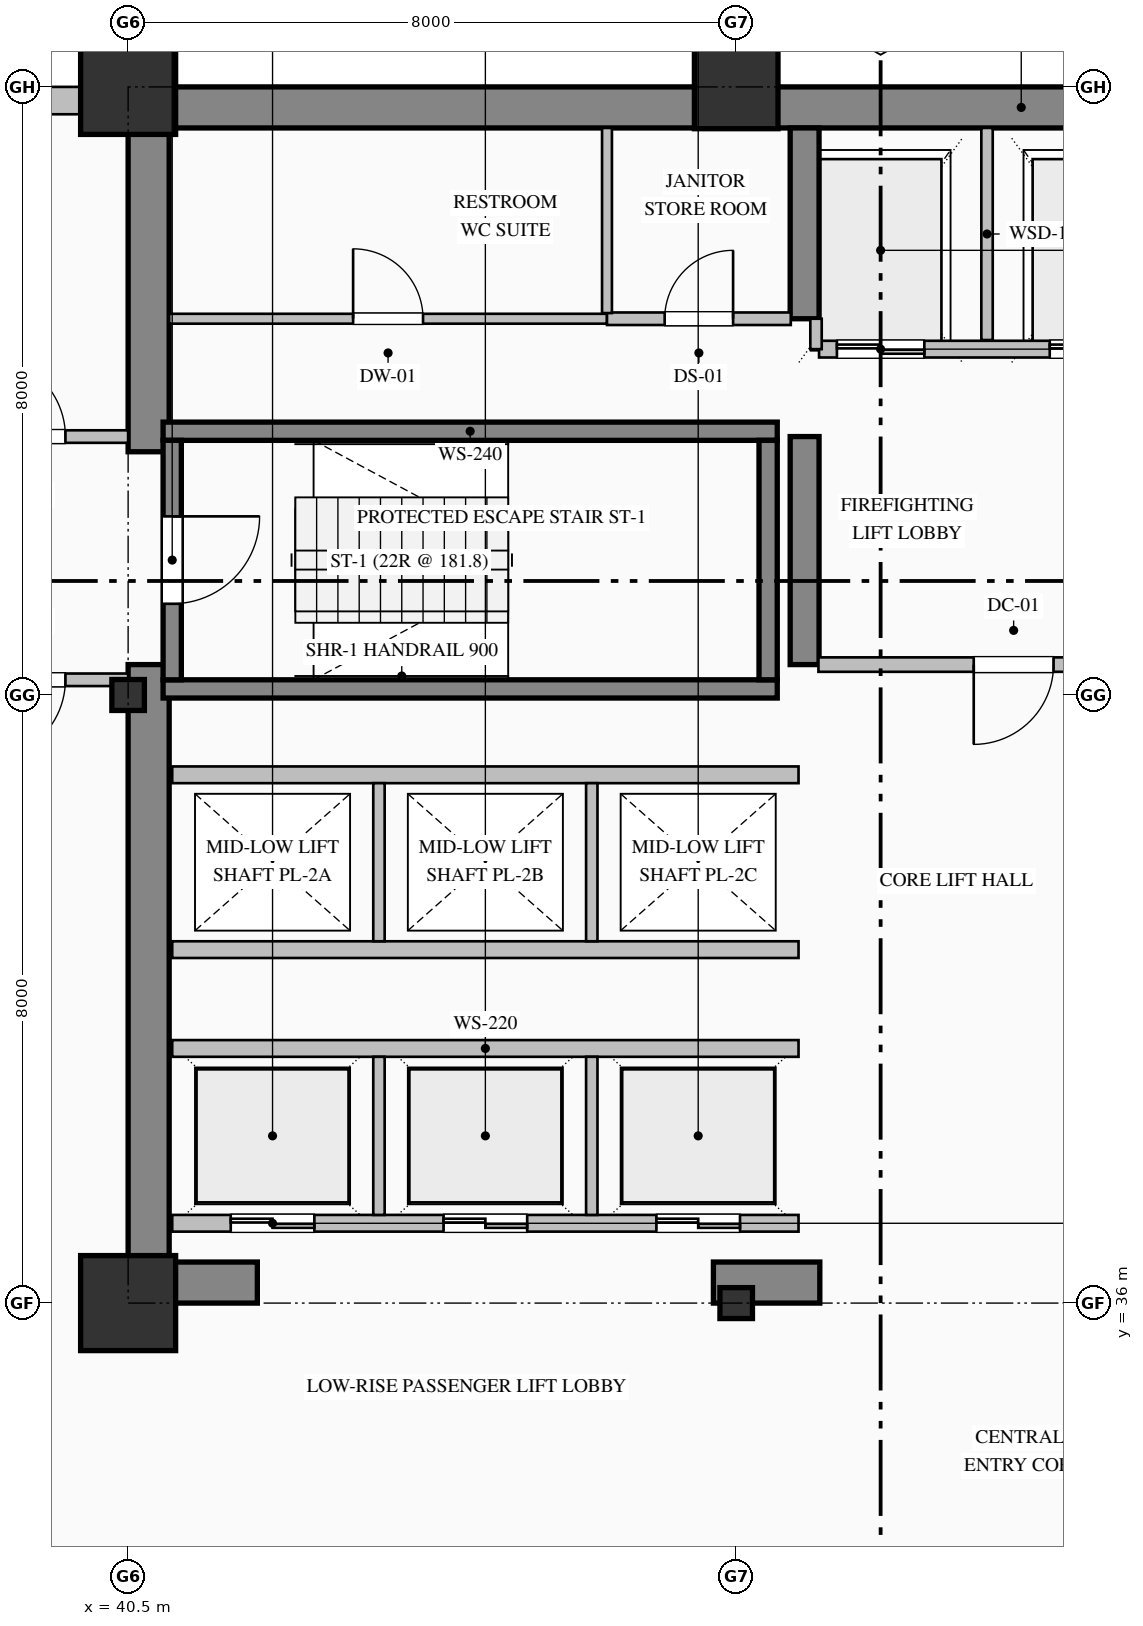
"""IFC4 building model, lengths in metres.
Left out: names, types, materials, properties, quantities, classifications, styles, units other than length and angle.
Written with IfcOpenShell. Run it as: python <this file> out.ifc"""

import sys

from ifc_helpers import new_model, si_unit, direction, frame, frame_2d, origin, origin_2d, place, context, subcontext, project, spatial, rectangle, hollow_rectangle, i_section, extrude, element, fill, save


model = new_model("IFC4")
c1 = context("Model", 3, precision=1e-05, world=origin(), true_north=direction((0.0, 1.0)))
c2 = subcontext(c1, "Body", "Model", "MODEL_VIEW")
j1 = project(units=[si_unit("LENGTHUNIT", "METRE"), si_unit("PLANEANGLEUNIT", "RADIAN")], contexts=[c1])
p1 = place(None, origin())
s1 = spatial("IfcSite", under=j1, at=p1, CompositionType="ELEMENT")
p2 = place(p1, origin())
s2 = spatial("IfcBuilding", under=s1, at=p2, CompositionType="ELEMENT")
p3 = place(p2, frame((0.0, 0.0, 92.2)))
s3 = spatial("IfcBuildingStorey", under=s2, at=p3, CompositionType="ELEMENT", Elevation=92.2)
p4 = place(p3, frame((40.5, 51.73, 0.0), z_axis=(0.0, 0.0, 1.0), x_axis=(1.0, 0.0, 0.0)))
e1 = element("IfcWall", 1, at=p4, inside=s3, PredefinedType="SHEAR", context=c2, shape_type="SweptSolid", body=[
    extrude(rectangle(XDim=23.5, YDim=0.54, at=frame_2d((11.75, 0.0))), origin(), (0.0, 0.0, 1.0), 3.75),
])
p5 = place(p3, frame((40.77, 36.54, 0.0), z_axis=(0.0, 0.0, 1.0), x_axis=(0.0, 1.0, 0.0)))
e2 = element("IfcWall", 2, at=p5, inside=s3, PredefinedType="SHEAR", context=c2, shape_type="SweptSolid", body=[
    extrude(rectangle(XDim=7.86, YDim=0.54, at=frame_2d((3.93, 0.0))), origin(), (0.0, 0.0, 1.0), 3.75),
])
p6 = place(p3, frame((40.77, 47.2, 0.0), z_axis=(0.0, 0.0, 1.0), x_axis=(0.0, 1.0, 0.0)))
e3 = element("IfcWall", 3, at=p6, inside=s3, PredefinedType="SHEAR", context=c2, shape_type="SweptSolid", body=[
    extrude(rectangle(XDim=4.26, YDim=0.54, at=frame_2d((2.13, 0.0))), origin(), (0.0, 0.0, 1.0), 3.75),
])
p7 = place(p3, frame((40.5, 36.27, 0.0), z_axis=(0.0, 0.0, 1.0), x_axis=(1.0, 0.0, 0.0)))
e4 = element("IfcWall", 4, at=p7, inside=s3, PredefinedType="SHEAR", context=c2, shape_type="SweptSolid", body=[
    extrude(rectangle(XDim=1.7, YDim=0.54, at=frame_2d((0.85, 0.0))), origin(), (0.0, 0.0, 1.0), 3.75),
])
p8 = place(p3, frame((48.2, 36.27, 0.0), z_axis=(0.0, 0.0, 1.0), x_axis=(1.0, 0.0, 0.0)))
e5 = element("IfcWall", 5, at=p8, inside=s3, PredefinedType="SHEAR", context=c2, shape_type="SweptSolid", body=[
    extrude(rectangle(XDim=1.4, YDim=0.54, at=frame_2d((0.7, 0.0))), origin(), (0.0, 0.0, 1.0), 3.75),
])
p9 = place(p3, frame((49.4, 44.4, 0.0), z_axis=(0.0, 0.0, 1.0), x_axis=(0.0, 1.0, 0.0)))
e6 = element("IfcWall", 6, at=p9, inside=s3, PredefinedType="SHEAR", context=c2, shape_type="SweptSolid", body=[
    extrude(rectangle(XDim=3.0, YDim=0.38, at=frame_2d((1.5, 0.0))), origin(), (0.0, 0.0, 1.0), 3.75),
])
p10 = place(p3, frame((49.4, 48.95, 0.0), z_axis=(0.0, 0.0, 1.0), x_axis=(0.0, 1.0, 0.0)))
e7 = element("IfcWall", 7, at=p10, inside=s3, PredefinedType="SHEAR", context=c2, shape_type="SweptSolid", body=[
    extrude(rectangle(XDim=2.51, YDim=0.38, at=frame_2d((1.255, 0.0))), origin(), (0.0, 0.0, 1.0), 3.75),
])
p11 = place(p3, frame((40.5, 36.0, 0.0), z_axis=(0.0, 0.0, 1.0), x_axis=(1.0, 0.0, 0.0)))
e8 = element("IfcColumn", 8, at=p11, inside=s3, PredefinedType="COLUMN", context=c2, shape_type="SweptSolid", body=[
    extrude(hollow_rectangle(XDim=1.25, YDim=1.25, WallThickness=0.045, at=origin_2d()), origin(), (0.0, 0.0, 1.0), 4.0),
])
p12 = place(p3, frame((40.5, 44.0, 0.0), z_axis=(0.0, 0.0, 1.0), x_axis=(1.0, 0.0, 0.0)))
e9 = element("IfcColumn", 9, at=p12, inside=s3, PredefinedType="COLUMN", context=c2, shape_type="SweptSolid", body=[
    extrude(i_section(OverallWidth=0.407, OverallDepth=0.428, WebThickness=0.02, FlangeThickness=0.035, FilletRadius=0.022, at=origin_2d()), origin(), (0.0, 0.0, 1.0), 4.0),
])
p13 = place(p3, frame((40.5, 52.0, 0.0), z_axis=(0.0, 0.0, 1.0), x_axis=(1.0, 0.0, 0.0)))
e10 = element("IfcColumn", 10, at=p13, inside=s3, PredefinedType="COLUMN", context=c2, shape_type="SweptSolid", body=[
    extrude(hollow_rectangle(XDim=1.25, YDim=1.25, WallThickness=0.045, at=origin_2d()), origin(), (0.0, 0.0, 1.0), 4.0),
])
p14 = place(p3, frame((48.5, 36.0, 0.0), z_axis=(0.0, 0.0, 1.0), x_axis=(1.0, 0.0, 0.0)))
e11 = element("IfcColumn", 11, at=p14, inside=s3, PredefinedType="COLUMN", context=c2, shape_type="SweptSolid", body=[
    extrude(i_section(OverallWidth=0.407, OverallDepth=0.428, WebThickness=0.02, FlangeThickness=0.035, FilletRadius=0.022, at=origin_2d()), origin(), (0.0, 0.0, 1.0), 4.0),
])
p15 = place(p3, frame((48.5, 52.0, 0.0), z_axis=(0.0, 0.0, 1.0), x_axis=(1.0, 0.0, 0.0)))
e12 = element("IfcColumn", 12, at=p15, inside=s3, PredefinedType="COLUMN", context=c2, shape_type="SweptSolid", body=[
    extrude(hollow_rectangle(XDim=1.1, YDim=1.1, WallThickness=0.04, at=origin_2d()), origin(), (0.0, 0.0, 1.0), 4.0),
])
p16 = place(p3, frame((4.0, 51.82, 0.0), z_axis=(0.0, 0.0, 1.0), x_axis=(1.0, 0.0, 0.0)))
e13 = element("IfcWall", 13, at=p16, inside=s3, PredefinedType="SOLIDWALL", context=c2, shape_type="SweptSolid", body=[
    extrude(rectangle(XDim=36.52, YDim=0.36, at=frame_2d((18.26, 0.0))), origin(), (0.0, 0.0, 1.0), 3.25),
])
p17 = place(p16, frame((16.95, 0.0, 0.85)))
e14 = element("IfcOpeningElement", 14, at=p17, cuts=e13, PredefinedType="OPENING", context=c2, shape_type="SweptSolid", body=[
    extrude(rectangle(XDim=2.1, YDim=2.05, at=frame_2d((1.05, 1.025))), frame((0.0, 0.19, 0.0), z_axis=(0.0, -1.0, 0.0), x_axis=(1.0, 0.0, 0.0)), (0.0, 0.0, 1.0), 0.38),
])
p18 = place(p16, frame((24.3, 0.0, 0.85)))
e15 = element("IfcOpeningElement", 15, at=p18, cuts=e13, PredefinedType="OPENING", context=c2, shape_type="SweptSolid", body=[
    extrude(rectangle(XDim=1.8, YDim=2.05, at=frame_2d((0.9, 1.025))), frame((0.0, 0.19, 0.0), z_axis=(0.0, -1.0, 0.0), x_axis=(1.0, 0.0, 0.0)), (0.0, 0.0, 1.0), 0.38),
])
for number, where, z_axis, x_axis in (
    (16, (40.96, 47.47, 0.0), (0.0, 0.0, 1.0), (1.0, 0.0, 0.0)),
    (17, (49.04, 44.08, 0.0), (0.0, 0.0, 1.0), (-1.0, 0.0, 0.0)),
):
    element("IfcWall", number, at=place(p3, frame(where, z_axis=z_axis, x_axis=x_axis)), inside=s3, PredefinedType="SOLIDWALL", context=c2, shape_type="SweptSolid", body=[
        extrude(rectangle(XDim=8.08, YDim=0.24, at=frame_2d((4.04, 0.0))), origin(), (0.0, 0.0, 1.0), 4.0),
    ])
p19 = place(p3, frame((41.08, 47.35, 0.0), z_axis=(0.0, 0.0, 1.0), x_axis=(0.0, -1.0, 0.0)))
e18 = element("IfcWall", 18, at=p19, inside=s3, PredefinedType="SOLIDWALL", context=c2, shape_type="SweptSolid", body=[
    extrude(rectangle(XDim=3.15, YDim=0.24, at=frame_2d((1.575, 0.0))), origin(), (0.0, 0.0, 1.0), 4.0),
])
p20 = place(p19, frame((1.0, 0.0, 0.0)))
e19 = element("IfcOpeningElement", 19, at=p20, cuts=e18, PredefinedType="OPENING", context=c2, shape_type="SweptSolid", body=[
    extrude(rectangle(XDim=1.15, YDim=2.2, at=frame_2d((0.575, 1.1))), frame((0.0, 0.13, 0.0), z_axis=(0.0, -1.0, 0.0), x_axis=(1.0, 0.0, 0.0)), (0.0, 0.0, 1.0), 0.26),
])
p21 = place(p3, frame((48.92, 44.2, 0.0), z_axis=(0.0, 0.0, 1.0), x_axis=(0.0, 1.0, 0.0)))
e20 = element("IfcWall", 20, at=p21, inside=s3, PredefinedType="SOLIDWALL", context=c2, shape_type="SweptSolid", body=[
    extrude(rectangle(XDim=3.15, YDim=0.24, at=frame_2d((1.575, 0.0))), origin(), (0.0, 0.0, 1.0), 4.0),
])
p22 = place(p3, frame((54.71, 48.55, 0.0), z_axis=(0.0, 0.0, 1.0), x_axis=(-1.0, 0.0, 0.0)))
e21 = element("IfcWall", 21, at=p22, inside=s3, PredefinedType="PARTITIONING", context=c2, shape_type="SweptSolid", body=[
    extrude(rectangle(XDim=5.12, YDim=0.22, at=frame_2d((2.56, 0.0))), origin(), (0.0, 0.0, 1.0), 3.75),
])
p23 = place(p22, frame((3.735, 0.0, 0.0)))
e22 = element("IfcOpeningElement", 22, at=p23, cuts=e21, PredefinedType="OPENING", context=c2, shape_type="SweptSolid", body=[
    extrude(rectangle(XDim=1.15, YDim=2.2, at=frame_2d((0.575, 1.1))), frame((0.0, 0.12, 0.0), z_axis=(0.0, -1.0, 0.0), x_axis=(1.0, 0.0, 0.0)), (0.0, 0.0, 1.0), 0.24),
])
p24 = place(p22, frame((0.935, 0.0, 0.0)))
e23 = element("IfcOpeningElement", 23, at=p24, cuts=e21, PredefinedType="OPENING", context=c2, shape_type="SweptSolid", body=[
    extrude(rectangle(XDim=1.15, YDim=2.2, at=frame_2d((0.575, 1.1))), frame((0.0, 0.12, 0.0), z_axis=(0.0, -1.0, 0.0), x_axis=(1.0, 0.0, 0.0)), (0.0, 0.0, 1.0), 0.24),
])
p25 = place(p3, frame((51.8, 48.67, 0.0), z_axis=(0.0, 0.0, 1.0), x_axis=(0.0, 1.0, 0.0)))
e24 = element("IfcWall", 24, at=p25, inside=s3, PredefinedType="PARTITIONING", context=c2, shape_type="SweptSolid", body=[
    extrude(rectangle(XDim=2.79, YDim=0.15, at=frame_2d((1.395, 0.0))), origin(), (0.0, 0.0, 1.0), 3.75),
])
p26 = place(p3, frame((49.55, 48.55, 0.0), z_axis=(0.0, 0.0, 1.0), x_axis=(0.0, 1.0, 0.0)))
e25 = element("IfcWall", 25, at=p26, inside=s3, PredefinedType="PARTITIONING", context=c2, shape_type="SweptSolid", body=[
    extrude(rectangle(XDim=0.4, YDim=0.15, at=frame_2d((0.2, 0.0))), origin(), (0.0, 0.0, 1.0), 3.75),
])
p27 = place(p3, frame((49.32, 37.05, 0.0), z_axis=(0.0, 0.0, 1.0), x_axis=(-1.0, 0.0, 0.0)))
e26 = element("IfcWall", 26, at=p27, inside=s3, PredefinedType="PARTITIONING", context=c2, shape_type="SweptSolid", body=[
    extrude(rectangle(XDim=8.24, YDim=0.22, at=frame_2d((4.12, 0.0))), origin(), (0.0, 0.0, 1.0), 3.75),
])
p28 = place(p27, frame((6.37, 0.0, 0.0)))
e27 = element("IfcOpeningElement", 27, at=p28, cuts=e26, PredefinedType="OPENING", context=c2, shape_type="SweptSolid", body=[
    extrude(rectangle(XDim=1.1, YDim=2.2, at=frame_2d((0.55, 1.1))), frame((0.0, 0.12, 0.0), z_axis=(0.0, -1.0, 0.0), x_axis=(1.0, 0.0, 0.0)), (0.0, 0.0, 1.0), 0.24),
])
p29 = place(p27, frame((3.57, 0.0, 0.0)))
e28 = element("IfcOpeningElement", 28, at=p29, cuts=e26, PredefinedType="OPENING", context=c2, shape_type="SweptSolid", body=[
    extrude(rectangle(XDim=1.1, YDim=2.2, at=frame_2d((0.55, 1.1))), frame((0.0, 0.12, 0.0), z_axis=(0.0, -1.0, 0.0), x_axis=(1.0, 0.0, 0.0)), (0.0, 0.0, 1.0), 0.24),
])
p30 = place(p27, frame((0.77, 0.0, 0.0)))
e29 = element("IfcOpeningElement", 29, at=p30, cuts=e26, PredefinedType="OPENING", context=c2, shape_type="SweptSolid", body=[
    extrude(rectangle(XDim=1.1, YDim=2.2, at=frame_2d((0.55, 1.1))), frame((0.0, 0.12, 0.0), z_axis=(0.0, -1.0, 0.0), x_axis=(1.0, 0.0, 0.0)), (0.0, 0.0, 1.0), 0.24),
])
p31 = place(p3, frame((41.08, 39.35, 0.0), z_axis=(0.0, 0.0, 1.0), x_axis=(1.0, 0.0, 0.0)))
e30 = element("IfcWall", 30, at=p31, inside=s3, PredefinedType="PARTITIONING", context=c2, shape_type="SweptSolid", body=[
    extrude(rectangle(XDim=8.24, YDim=0.22, at=frame_2d((4.12, 0.0))), origin(), (0.0, 0.0, 1.0), 3.75),
])
for number, where, z_axis, x_axis in (
    (31, (43.8, 37.16, 0.0), (0.0, 0.0, 1.0), (0.0, 1.0, 0.0)),
    (32, (46.6, 37.16, 0.0), (0.0, 0.0, 1.0), (0.0, 1.0, 0.0)),
):
    element("IfcWall", number, at=place(p3, frame(where, z_axis=z_axis, x_axis=x_axis)), inside=s3, PredefinedType="PARTITIONING", context=c2, shape_type="SweptSolid", body=[
        extrude(rectangle(XDim=2.08, YDim=0.15, at=frame_2d((1.04, 0.0))), origin(), (0.0, 0.0, 1.0), 3.75),
    ])
for number, where, z_axis, x_axis in (
    (33, (49.32, 40.65, 0.0), (0.0, 0.0, 1.0), (-1.0, 0.0, 0.0)),
    (34, (41.08, 42.95, 0.0), (0.0, 0.0, 1.0), (1.0, 0.0, 0.0)),
):
    element("IfcWall", number, at=place(p3, frame(where, z_axis=z_axis, x_axis=x_axis)), inside=s3, PredefinedType="PARTITIONING", context=c2, shape_type="SweptSolid", body=[
        extrude(rectangle(XDim=8.24, YDim=0.22, at=frame_2d((4.12, 0.0))), origin(), (0.0, 0.0, 1.0), 3.75),
    ])
for number, where, z_axis, x_axis in (
    (35, (43.8, 40.76, 0.0), (0.0, 0.0, 1.0), (0.0, 1.0, 0.0)),
    (36, (46.6, 40.76, 0.0), (0.0, 0.0, 1.0), (0.0, 1.0, 0.0)),
):
    element("IfcWall", number, at=place(p3, frame(where, z_axis=z_axis, x_axis=x_axis)), inside=s3, PredefinedType="PARTITIONING", context=c2, shape_type="SweptSolid", body=[
        extrude(rectangle(XDim=2.08, YDim=0.15, at=frame_2d((1.04, 0.0))), origin(), (0.0, 0.0, 1.0), 3.75),
    ])
p32 = place(p3, frame((37.8, 47.4, 0.0), z_axis=(0.0, 0.0, 1.0), x_axis=(1.0, 0.0, 0.0)))
e37 = element("IfcWall", 37, at=p32, inside=s3, PredefinedType="PARTITIONING", context=c2, shape_type="SweptSolid", body=[
    extrude(rectangle(XDim=2.7, YDim=0.165, at=frame_2d((1.35, 0.0))), origin(), (0.0, 0.0, 1.0), 3.75),
])
p33 = place(p32, frame((0.825, 0.0, 0.0)))
e38 = element("IfcOpeningElement", 38, at=p33, cuts=e37, PredefinedType="OPENING", context=c2, shape_type="SweptSolid", body=[
    extrude(rectangle(XDim=1.05, YDim=2.15, at=frame_2d((0.525, 1.075))), frame((0.0, 0.093, 0.0), z_axis=(0.0, -1.0, 0.0), x_axis=(1.0, 0.0, 0.0)), (0.0, 0.0, 1.0), 0.185),
])
p34 = place(p3, frame((40.5, 44.2, 0.0), z_axis=(0.0, 0.0, 1.0), x_axis=(-1.0, 0.0, 0.0)))
e39 = element("IfcWall", 39, at=p34, inside=s3, PredefinedType="PARTITIONING", context=c2, shape_type="SweptSolid", body=[
    extrude(rectangle(XDim=2.7, YDim=0.165, at=frame_2d((1.35, 0.0))), origin(), (0.0, 0.0, 1.0), 3.75),
])
p35 = place(p34, frame((0.825, 0.0, 0.0)))
e40 = element("IfcOpeningElement", 40, at=p35, cuts=e39, PredefinedType="OPENING", context=c2, shape_type="SweptSolid", body=[
    extrude(rectangle(XDim=1.05, YDim=2.15, at=frame_2d((0.525, 1.075))), frame((0.0, 0.093, 0.0), z_axis=(0.0, -1.0, 0.0), x_axis=(1.0, 0.0, 0.0)), (0.0, 0.0, 1.0), 0.185),
])
p36 = place(p3, frame((41.04, 48.95, 0.0), z_axis=(0.0, 0.0, 1.0), x_axis=(1.0, 0.0, 0.0)))
e41 = element("IfcWall", 41, at=p36, inside=s3, PredefinedType="PARTITIONING", context=c2, shape_type="SweptSolid", body=[
    extrude(rectangle(XDim=5.76, YDim=0.13, at=frame_2d((2.88, 0.0))), origin(), (0.0, 0.0, 1.0), 3.75),
])
p37 = place(p36, frame((2.42, 0.0, 0.0)))
e42 = element("IfcOpeningElement", 42, at=p37, cuts=e41, PredefinedType="OPENING", context=c2, shape_type="SweptSolid", body=[
    extrude(rectangle(XDim=0.92, YDim=2.15, at=frame_2d((0.46, 1.075))), frame((0.0, 0.075, 0.0), z_axis=(0.0, -1.0, 0.0), x_axis=(1.0, 0.0, 0.0)), (0.0, 0.0, 1.0), 0.15),
])
p38 = place(p3, frame((46.8, 48.95, 0.0), z_axis=(0.0, 0.0, 1.0), x_axis=(1.0, 0.0, 0.0)))
e43 = element("IfcWall", 43, at=p38, inside=s3, PredefinedType="PARTITIONING", context=c2, shape_type="SweptSolid", body=[
    extrude(rectangle(XDim=2.418, YDim=0.165, at=frame_2d((1.209, 0.0))), origin(), (0.0, 0.0, 1.0), 3.75),
])
p39 = place(p38, frame((0.759, 0.0, 0.0)))
e44 = element("IfcOpeningElement", 44, at=p39, cuts=e43, PredefinedType="OPENING", context=c2, shape_type="SweptSolid", body=[
    extrude(rectangle(XDim=0.9, YDim=2.15, at=frame_2d((0.45, 1.075))), frame((0.0, 0.093, 0.0), z_axis=(0.0, -1.0, 0.0), x_axis=(1.0, 0.0, 0.0)), (0.0, 0.0, 1.0), 0.185),
])
p40 = place(p3, frame((54.718, 44.4, 0.0), z_axis=(0.0, 0.0, 1.0), x_axis=(-1.0, 0.0, 0.0)))
e45 = element("IfcWall", 45, at=p40, inside=s3, PredefinedType="PARTITIONING", context=c2, shape_type="SweptSolid", body=[
    extrude(rectangle(XDim=5.136, YDim=0.19, at=frame_2d((2.568, 0.0))), origin(), (0.0, 0.0, 1.0), 3.75),
])
p41 = place(p40, frame((2.043, 0.0, 0.0)))
e46 = element("IfcOpeningElement", 46, at=p41, cuts=e45, PredefinedType="OPENING", context=c2, shape_type="SweptSolid", body=[
    extrude(rectangle(XDim=1.05, YDim=2.15, at=frame_2d((0.525, 1.075))), frame((0.0, 0.105, 0.0), z_axis=(0.0, -1.0, 0.0), x_axis=(1.0, 0.0, 0.0)), (0.0, 0.0, 1.0), 0.21),
])
p42 = place(p3, frame((46.8, 51.46, 0.0), z_axis=(0.0, 0.0, 1.0), x_axis=(0.0, -1.0, 0.0)))
e47 = element("IfcWall", 47, at=p42, inside=s3, PredefinedType="PARTITIONING", context=c2, shape_type="SweptSolid", body=[
    extrude(rectangle(XDim=2.436, YDim=0.13, at=frame_2d((1.218, 0.0))), origin(), (0.0, 0.0, 1.0), 3.75),
])
p43 = place(p20, origin())
e48 = element("IfcDoor", 48, at=p43, inside=s3, OperationType="SINGLE_SWING_LEFT", PredefinedType="DOOR", context=c2, shape_type="SweptSolid", body=[
    extrude(rectangle(XDim=1.15, YDim=2.2, at=frame_2d((0.575, 1.1))), frame((0.0, 0.025, 0.0), z_axis=(0.0, -1.0, 0.0), x_axis=(1.0, 0.0, 0.0)), (0.0, 0.0, 1.0), 0.05),
])
fill(e19, e48)
p44 = place(p23, origin())
e49 = element("IfcDoor", 49, at=p44, inside=s3, OperationType="DOUBLE_DOOR_SLIDING", PredefinedType="DOOR", context=c2, shape_type="SweptSolid", body=[
    extrude(rectangle(XDim=1.15, YDim=2.2, at=frame_2d((0.575, 1.1))), frame((0.0, 0.025, 0.0), z_axis=(0.0, -1.0, 0.0), x_axis=(1.0, 0.0, 0.0)), (0.0, 0.0, 1.0), 0.05),
])
fill(e22, e49)
p45 = place(p24, origin())
e50 = element("IfcDoor", 50, at=p45, inside=s3, OperationType="DOUBLE_DOOR_SLIDING", PredefinedType="DOOR", context=c2, shape_type="SweptSolid", body=[
    extrude(rectangle(XDim=1.15, YDim=2.2, at=frame_2d((0.575, 1.1))), frame((0.0, 0.025, 0.0), z_axis=(0.0, -1.0, 0.0), x_axis=(1.0, 0.0, 0.0)), (0.0, 0.0, 1.0), 0.05),
])
fill(e23, e50)
p46 = place(p28, origin())
e51 = element("IfcDoor", 51, at=p46, inside=s3, OperationType="DOUBLE_DOOR_SLIDING", PredefinedType="DOOR", context=c2, shape_type="SweptSolid", body=[
    extrude(rectangle(XDim=1.1, YDim=2.2, at=frame_2d((0.55, 1.1))), frame((0.0, 0.025, 0.0), z_axis=(0.0, -1.0, 0.0), x_axis=(1.0, 0.0, 0.0)), (0.0, 0.0, 1.0), 0.05),
])
fill(e27, e51)
p47 = place(p29, origin())
e52 = element("IfcDoor", 52, at=p47, inside=s3, OperationType="DOUBLE_DOOR_SLIDING", PredefinedType="DOOR", context=c2, shape_type="SweptSolid", body=[
    extrude(rectangle(XDim=1.1, YDim=2.2, at=frame_2d((0.55, 1.1))), frame((0.0, 0.025, 0.0), z_axis=(0.0, -1.0, 0.0), x_axis=(1.0, 0.0, 0.0)), (0.0, 0.0, 1.0), 0.05),
])
fill(e28, e52)
p48 = place(p30, origin())
e53 = element("IfcDoor", 53, at=p48, inside=s3, OperationType="DOUBLE_DOOR_SLIDING", PredefinedType="DOOR", context=c2, shape_type="SweptSolid", body=[
    extrude(rectangle(XDim=1.1, YDim=2.2, at=frame_2d((0.55, 1.1))), frame((0.0, 0.025, 0.0), z_axis=(0.0, -1.0, 0.0), x_axis=(1.0, 0.0, 0.0)), (0.0, 0.0, 1.0), 0.05),
])
fill(e29, e53)
p49 = place(p41, origin())
e54 = element("IfcDoor", 54, at=p49, inside=s3, OperationType="SINGLE_SWING_RIGHT", PredefinedType="DOOR", context=c2, shape_type="SweptSolid", body=[
    extrude(rectangle(XDim=1.05, YDim=2.15, at=frame_2d((0.525, 1.075))), frame((0.0, 0.025, 0.0), z_axis=(0.0, -1.0, 0.0), x_axis=(1.0, 0.0, 0.0)), (0.0, 0.0, 1.0), 0.05),
])
fill(e46, e54)
p50 = place(p33, origin())
e55 = element("IfcDoor", 55, at=p50, inside=s3, OperationType="SINGLE_SWING_LEFT", PredefinedType="DOOR", context=c2, shape_type="SweptSolid", body=[
    extrude(rectangle(XDim=1.05, YDim=2.15, at=frame_2d((0.525, 1.075))), frame((0.0, 0.025, 0.0), z_axis=(0.0, -1.0, 0.0), x_axis=(1.0, 0.0, 0.0)), (0.0, 0.0, 1.0), 0.05),
])
fill(e38, e55)
p51 = place(p35, origin())
e56 = element("IfcDoor", 56, at=p51, inside=s3, OperationType="SINGLE_SWING_RIGHT", PredefinedType="DOOR", context=c2, shape_type="SweptSolid", body=[
    extrude(rectangle(XDim=1.05, YDim=2.15, at=frame_2d((0.525, 1.075))), frame((0.0, 0.025, 0.0), z_axis=(0.0, -1.0, 0.0), x_axis=(1.0, 0.0, 0.0)), (0.0, 0.0, 1.0), 0.05),
])
fill(e40, e56)
p52 = place(p37, origin())
e57 = element("IfcDoor", 57, at=p52, inside=s3, OperationType="SINGLE_SWING_LEFT", PredefinedType="DOOR", context=c2, shape_type="SweptSolid", body=[
    extrude(rectangle(XDim=0.92, YDim=2.15, at=frame_2d((0.46, 1.075))), frame((0.0, 0.025, 0.0), z_axis=(0.0, -1.0, 0.0), x_axis=(1.0, 0.0, 0.0)), (0.0, 0.0, 1.0), 0.05),
])
fill(e42, e57)
p53 = place(p39, origin())
e58 = element("IfcDoor", 58, at=p53, inside=s3, OperationType="SINGLE_SWING_RIGHT", PredefinedType="DOOR", context=c2, shape_type="SweptSolid", body=[
    extrude(rectangle(XDim=0.9, YDim=2.15, at=frame_2d((0.45, 1.075))), frame((0.0, 0.025, 0.0), z_axis=(0.0, -1.0, 0.0), x_axis=(1.0, 0.0, 0.0)), (0.0, 0.0, 1.0), 0.05),
])
fill(e44, e58)
save(model, sys.argv[1])
